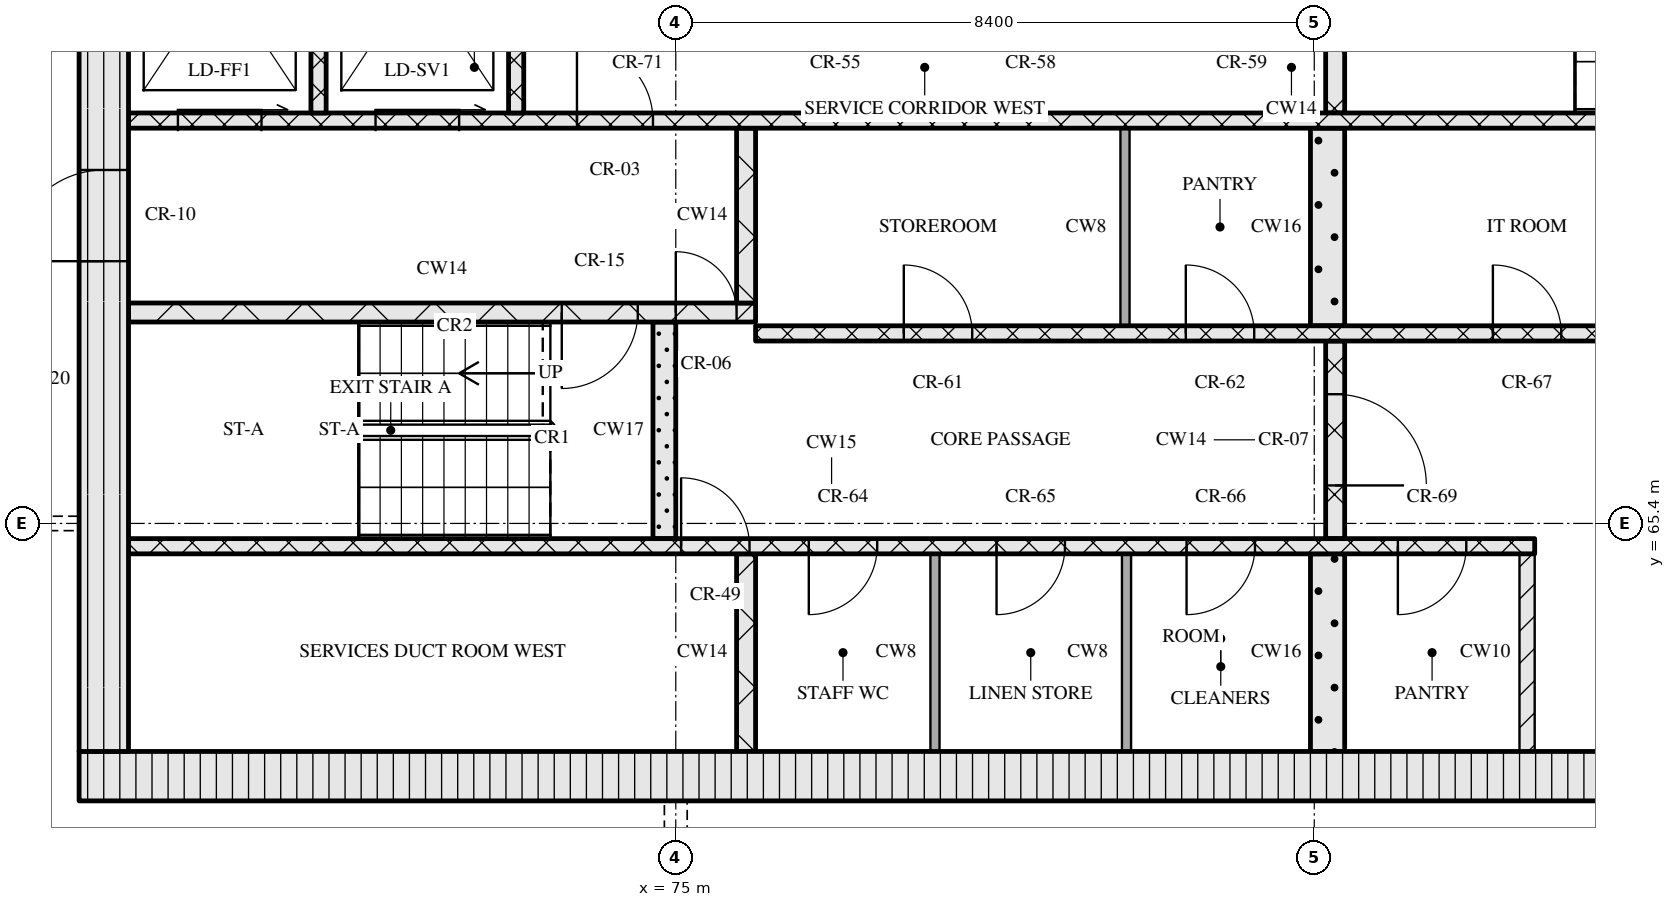
"""IFC4 building model, lengths in metres.
Left out: names, types, materials, properties, quantities, classifications, styles, units other than length and angle.
Written with IfcOpenShell. Run it as: python <this file> out.ifc"""

import sys

from ifc_helpers import new_model, si_unit, direction, frame, frame_2d, origin, place, context, subcontext, project, spatial, rectangle, extrude, element, fill, save


model = new_model("IFC4")
c1 = context("Model", 3, precision=1e-05, world=origin(), true_north=direction((0.0, 1.0)))
c2 = subcontext(c1, "Body", "Model", "MODEL_VIEW")
j1 = project(units=[si_unit("LENGTHUNIT", "METRE"), si_unit("PLANEANGLEUNIT", "RADIAN")], contexts=[c1])
p1 = place(None, origin())
s1 = spatial("IfcSite", under=j1, at=p1, CompositionType="ELEMENT")
p2 = place(p1, origin())
s2 = spatial("IfcBuilding", under=s1, at=p2, CompositionType="ELEMENT")
p3 = place(p2, frame((0.0, 0.0, 248.7)))
s3 = spatial("IfcBuildingStorey", under=s2, at=p3, CompositionType="ELEMENT", Elevation=248.7)
p4 = place(p3, frame((67.15, 62.075, 0.0), z_axis=(0.0, 0.0, 1.0), x_axis=(1.0, 0.0, 0.0)))
e1 = element("IfcWall", 1, at=p4, inside=s3, PredefinedType="SOLIDWALL", context=c2, shape_type="SweptSolid", body=[
    extrude(rectangle(XDim=40.9, YDim=0.65, at=frame_2d((20.45, 0.0))), origin(), (0.0, 0.0, 1.0), 3.3),
])
p5 = place(p4, frame((20.8, 0.0, 0.0)))
e2 = element("IfcOpeningElement", 2, at=p5, cuts=e1, PredefinedType="OPENING", context=c2, shape_type="SweptSolid", body=[
    extrude(rectangle(XDim=1.8, YDim=2.1, at=frame_2d((0.9, 1.05))), frame((0.0, 0.335, 0.0), z_axis=(0.0, -1.0, 0.0), x_axis=(1.0, 0.0, 0.0)), (0.0, 0.0, 1.0), 0.67),
])
p6 = place(p3, frame((67.475, 62.4, 0.0), z_axis=(0.0, 0.0, 1.0), x_axis=(0.0, 1.0, 0.0)))
e3 = element("IfcWall", 3, at=p6, inside=s3, PredefinedType="SOLIDWALL", context=c2, shape_type="SweptSolid", body=[
    extrude(rectangle(XDim=12.0, YDim=0.65, at=frame_2d((6.0, 0.0))), origin(), (0.0, 0.0, 1.0), 3.3),
])
p7 = place(p6, frame((6.45, 0.0, 0.0)))
e4 = element("IfcOpeningElement", 4, at=p7, cuts=e3, PredefinedType="OPENING", context=c2, shape_type="SweptSolid", body=[
    extrude(rectangle(XDim=1.2, YDim=2.1, at=frame_2d((0.6, 1.05))), frame((0.0, 0.335, 0.0), z_axis=(0.0, -1.0, 0.0), x_axis=(1.0, 0.0, 0.0)), (0.0, 0.0, 1.0), 0.67),
])
p8 = place(p3, frame((75.925, 62.4, 0.0), z_axis=(0.0, 0.0, 1.0), x_axis=(0.0, 1.0, 0.0)))
e5 = element("IfcWall", 5, at=p8, inside=s3, PredefinedType="SOLIDWALL", context=c2, shape_type="SweptSolid", body=[
    extrude(rectangle(XDim=2.6, YDim=0.25, at=frame_2d((1.3, 0.0))), origin(), (0.0, 0.0, 1.0), 3.3),
])
for number, where, z_axis, x_axis in (
    (6, (78.41, 62.4, 0.0), (0.0, 0.0, 1.0), (0.0, 1.0, 0.0)),
    (7, (80.93, 62.4, 0.0), (0.0, 0.0, 1.0), (0.0, 1.0, 0.0)),
):
    element("IfcWall", number, at=place(p3, frame(where, z_axis=z_axis, x_axis=x_axis)), inside=s3, PredefinedType="PARTITIONING", context=c2, shape_type="SweptSolid", body=[
        extrude(rectangle(XDim=2.6, YDim=0.12, at=frame_2d((1.3, 0.0))), origin(), (0.0, 0.0, 1.0), 3.3),
    ])
p9 = place(p3, frame((83.575, 62.4, 0.0), z_axis=(0.0, 0.0, 1.0), x_axis=(0.0, 1.0, 0.0)))
e8 = element("IfcWall", 8, at=p9, inside=s3, PredefinedType="SOLIDWALL", context=c2, shape_type="SweptSolid", body=[
    extrude(rectangle(XDim=2.6, YDim=0.45, at=frame_2d((1.3, 0.0))), origin(), (0.0, 0.0, 1.0), 3.3),
])
p10 = place(p3, frame((86.2, 62.4, 0.0), z_axis=(0.0, 0.0, 1.0), x_axis=(0.0, 1.0, 0.0)))
e9 = element("IfcWall", 9, at=p10, inside=s3, PredefinedType="PARTITIONING", context=c2, shape_type="SweptSolid", body=[
    extrude(rectangle(XDim=2.6, YDim=0.2, at=frame_2d((1.3, 0.0))), origin(), (0.0, 0.0, 1.0), 3.3),
])
p11 = place(p3, frame((67.8, 65.1, 0.0), z_axis=(0.0, 0.0, 1.0), x_axis=(1.0, 0.0, 0.0)))
e10 = element("IfcWall", 10, at=p11, inside=s3, PredefinedType="SOLIDWALL", context=c2, shape_type="SweptSolid", body=[
    extrude(rectangle(XDim=18.5, YDim=0.2, at=frame_2d((9.25, 0.0))), origin(), (0.0, 0.0, 1.0), 3.3),
])
p12 = place(p11, frame((7.27, 0.0, 0.0)))
e11 = element("IfcOpeningElement", 11, at=p12, cuts=e10, PredefinedType="OPENING", context=c2, shape_type="SweptSolid", body=[
    extrude(rectangle(XDim=0.9, YDim=2.1, at=frame_2d((0.45, 1.05))), frame((0.0, 0.11, 0.0), z_axis=(0.0, -1.0, 0.0), x_axis=(1.0, 0.0, 0.0)), (0.0, 0.0, 1.0), 0.22),
])
p13 = place(p11, frame((8.95, 0.0, 0.0)))
e12 = element("IfcOpeningElement", 12, at=p13, cuts=e10, PredefinedType="OPENING", context=c2, shape_type="SweptSolid", body=[
    extrude(rectangle(XDim=0.9, YDim=2.1, at=frame_2d((0.45, 1.05))), frame((0.0, 0.11, 0.0), z_axis=(0.0, -1.0, 0.0), x_axis=(1.0, 0.0, 0.0)), (0.0, 0.0, 1.0), 0.22),
])
p14 = place(p11, frame((11.42, 0.0, 0.0)))
e13 = element("IfcOpeningElement", 13, at=p14, cuts=e10, PredefinedType="OPENING", context=c2, shape_type="SweptSolid", body=[
    extrude(rectangle(XDim=0.9, YDim=2.1, at=frame_2d((0.45, 1.05))), frame((0.0, 0.11, 0.0), z_axis=(0.0, -1.0, 0.0), x_axis=(1.0, 0.0, 0.0)), (0.0, 0.0, 1.0), 0.22),
])
p15 = place(p11, frame((13.92, 0.0, 0.0)))
e14 = element("IfcOpeningElement", 14, at=p15, cuts=e10, PredefinedType="OPENING", context=c2, shape_type="SweptSolid", body=[
    extrude(rectangle(XDim=0.9, YDim=2.1, at=frame_2d((0.45, 1.05))), frame((0.0, 0.11, 0.0), z_axis=(0.0, -1.0, 0.0), x_axis=(1.0, 0.0, 0.0)), (0.0, 0.0, 1.0), 0.22),
])
p16 = place(p11, frame((16.7, 0.0, 0.0)))
e15 = element("IfcOpeningElement", 15, at=p16, cuts=e10, PredefinedType="OPENING", context=c2, shape_type="SweptSolid", body=[
    extrude(rectangle(XDim=0.9, YDim=2.1, at=frame_2d((0.45, 1.05))), frame((0.0, 0.11, 0.0), z_axis=(0.0, -1.0, 0.0), x_axis=(1.0, 0.0, 0.0)), (0.0, 0.0, 1.0), 0.22),
])
p17 = place(p3, frame((74.85, 65.2, 0.0), z_axis=(0.0, 0.0, 1.0), x_axis=(0.0, 1.0, 0.0)))
e16 = element("IfcWall", 16, at=p17, inside=s3, PredefinedType="SOLIDWALL", context=c2, shape_type="SweptSolid", body=[
    extrude(rectangle(XDim=2.85, YDim=0.3, at=frame_2d((1.425, 0.0))), origin(), (0.0, 0.0, 1.0), 3.3),
])
p18 = place(p3, frame((83.675, 65.2, 0.0), z_axis=(0.0, 0.0, 1.0), x_axis=(0.0, 1.0, 0.0)))
e17 = element("IfcWall", 17, at=p18, inside=s3, PredefinedType="SOLIDWALL", context=c2, shape_type="SweptSolid", body=[
    extrude(rectangle(XDim=2.6, YDim=0.25, at=frame_2d((1.3, 0.0))), origin(), (0.0, 0.0, 1.0), 3.3),
])
p19 = place(p18, frame((0.7, 0.0, 0.0)))
e18 = element("IfcOpeningElement", 18, at=p19, cuts=e17, PredefinedType="OPENING", context=c2, shape_type="SweptSolid", body=[
    extrude(rectangle(XDim=1.2, YDim=2.1, at=frame_2d((0.6, 1.05))), frame((0.0, 0.135, 0.0), z_axis=(0.0, -1.0, 0.0), x_axis=(1.0, 0.0, 0.0)), (0.0, 0.0, 1.0), 0.27),
])
p20 = place(p3, frame((76.05, 67.9, 0.0), z_axis=(0.0, 0.0, 1.0), x_axis=(1.0, 0.0, 0.0)))
e19 = element("IfcWall", 19, at=p20, inside=s3, PredefinedType="SOLIDWALL", context=c2, shape_type="SweptSolid", body=[
    extrude(rectangle(XDim=23.1, YDim=0.2, at=frame_2d((11.55, 0.0))), origin(), (0.0, 0.0, 1.0), 3.3),
])
p21 = place(p20, frame((1.95, 0.0, 0.0)))
e20 = element("IfcOpeningElement", 20, at=p21, cuts=e19, PredefinedType="OPENING", context=c2, shape_type="SweptSolid", body=[
    extrude(rectangle(XDim=0.9, YDim=2.1, at=frame_2d((0.45, 1.05))), frame((0.0, 0.11, 0.0), z_axis=(0.0, -1.0, 0.0), x_axis=(1.0, 0.0, 0.0)), (0.0, 0.0, 1.0), 0.22),
])
p22 = place(p20, frame((5.66, 0.0, 0.0)))
e21 = element("IfcOpeningElement", 21, at=p22, cuts=e19, PredefinedType="OPENING", context=c2, shape_type="SweptSolid", body=[
    extrude(rectangle(XDim=0.9, YDim=2.1, at=frame_2d((0.45, 1.05))), frame((0.0, 0.11, 0.0), z_axis=(0.0, -1.0, 0.0), x_axis=(1.0, 0.0, 0.0)), (0.0, 0.0, 1.0), 0.22),
])
p23 = place(p20, frame((9.7, 0.0, 0.0)))
e22 = element("IfcOpeningElement", 22, at=p23, cuts=e19, PredefinedType="OPENING", context=c2, shape_type="SweptSolid", body=[
    extrude(rectangle(XDim=0.9, YDim=2.1, at=frame_2d((0.45, 1.05))), frame((0.0, 0.11, 0.0), z_axis=(0.0, -1.0, 0.0), x_axis=(1.0, 0.0, 0.0)), (0.0, 0.0, 1.0), 0.22),
])
p24 = place(p20, frame((13.55, 0.0, 0.0)))
e23 = element("IfcOpeningElement", 23, at=p24, cuts=e19, PredefinedType="OPENING", context=c2, shape_type="SweptSolid", body=[
    extrude(rectangle(XDim=1.0, YDim=2.1, at=frame_2d((0.5, 1.05))), frame((0.0, 0.11, 0.0), z_axis=(0.0, -1.0, 0.0), x_axis=(1.0, 0.0, 0.0)), (0.0, 0.0, 1.0), 0.22),
])
p25 = place(p20, frame((16.2, 0.0, 0.0)))
e24 = element("IfcOpeningElement", 24, at=p25, cuts=e19, PredefinedType="OPENING", context=c2, shape_type="SweptSolid", body=[
    extrude(rectangle(XDim=1.1, YDim=2.1, at=frame_2d((0.55, 1.05))), frame((0.0, 0.11, 0.0), z_axis=(0.0, -1.0, 0.0), x_axis=(1.0, 0.0, 0.0)), (0.0, 0.0, 1.0), 0.22),
])
p26 = place(p20, frame((18.7, 0.0, 0.0)))
e25 = element("IfcOpeningElement", 25, at=p26, cuts=e19, PredefinedType="OPENING", context=c2, shape_type="SweptSolid", body=[
    extrude(rectangle(XDim=1.1, YDim=2.1, at=frame_2d((0.55, 1.05))), frame((0.0, 0.11, 0.0), z_axis=(0.0, -1.0, 0.0), x_axis=(1.0, 0.0, 0.0)), (0.0, 0.0, 1.0), 0.22),
])
p27 = place(p20, frame((21.2, 0.0, 0.0)))
e26 = element("IfcOpeningElement", 26, at=p27, cuts=e19, PredefinedType="OPENING", context=c2, shape_type="SweptSolid", body=[
    extrude(rectangle(XDim=1.1, YDim=2.1, at=frame_2d((0.55, 1.05))), frame((0.0, 0.11, 0.0), z_axis=(0.0, -1.0, 0.0), x_axis=(1.0, 0.0, 0.0)), (0.0, 0.0, 1.0), 0.22),
])
p28 = place(p3, frame((80.91, 68.0, 0.0), z_axis=(0.0, 0.0, 1.0), x_axis=(0.0, 1.0, 0.0)))
e27 = element("IfcWall", 27, at=p28, inside=s3, PredefinedType="PARTITIONING", context=c2, shape_type="SweptSolid", body=[
    extrude(rectangle(XDim=2.6, YDim=0.12, at=frame_2d((1.3, 0.0))), origin(), (0.0, 0.0, 1.0), 3.3),
])
p29 = place(p3, frame((83.575, 68.0, 0.0), z_axis=(0.0, 0.0, 1.0), x_axis=(0.0, 1.0, 0.0)))
e28 = element("IfcWall", 28, at=p29, inside=s3, PredefinedType="SOLIDWALL", context=c2, shape_type="SweptSolid", body=[
    extrude(rectangle(XDim=2.6, YDim=0.45, at=frame_2d((1.3, 0.0))), origin(), (0.0, 0.0, 1.0), 3.3),
])
p30 = place(p3, frame((67.8, 68.175, 0.0), z_axis=(0.0, 0.0, 1.0), x_axis=(1.0, 0.0, 0.0)))
e29 = element("IfcWall", 29, at=p30, inside=s3, PredefinedType="SOLIDWALL", context=c2, shape_type="SweptSolid", body=[
    extrude(rectangle(XDim=8.25, YDim=0.25, at=frame_2d((4.125, 0.0))), origin(), (0.0, 0.0, 1.0), 3.3),
])
p31 = place(p30, frame((5.7, 0.0, 0.0)))
e30 = element("IfcOpeningElement", 30, at=p31, cuts=e29, PredefinedType="OPENING", context=c2, shape_type="SweptSolid", body=[
    extrude(rectangle(XDim=1.0, YDim=2.1, at=frame_2d((0.5, 1.05))), frame((0.0, 0.135, 0.0), z_axis=(0.0, -1.0, 0.0), x_axis=(1.0, 0.0, 0.0)), (0.0, 0.0, 1.0), 0.27),
])
p32 = place(p30, frame((7.2, 0.0, 0.0)))
e31 = element("IfcOpeningElement", 31, at=p32, cuts=e29, PredefinedType="OPENING", context=c2, shape_type="SweptSolid", body=[
    extrude(rectangle(XDim=0.8, YDim=2.1, at=frame_2d((0.4, 1.05))), frame((0.0, 0.135, 0.0), z_axis=(0.0, -1.0, 0.0), x_axis=(1.0, 0.0, 0.0)), (0.0, 0.0, 1.0), 0.27),
])
p33 = place(p3, frame((75.925, 68.3, 0.0), z_axis=(0.0, 0.0, 1.0), x_axis=(0.0, 1.0, 0.0)))
e32 = element("IfcWall", 32, at=p33, inside=s3, PredefinedType="SOLIDWALL", context=c2, shape_type="SweptSolid", body=[
    extrude(rectangle(XDim=2.3, YDim=0.25, at=frame_2d((1.15, 0.0))), origin(), (0.0, 0.0, 1.0), 3.3),
])
p34 = place(p3, frame((67.8, 70.7, 0.0), z_axis=(0.0, 0.0, 1.0), x_axis=(1.0, 0.0, 0.0)))
e33 = element("IfcWall", 33, at=p34, inside=s3, PredefinedType="SOLIDWALL", context=c2, shape_type="SweptSolid", body=[
    extrude(rectangle(XDim=39.6, YDim=0.2, at=frame_2d((19.8, 0.0))), origin(), (0.0, 0.0, 1.0), 3.3),
])
p35 = place(p34, frame((0.65, 0.0, 0.0)))
e34 = element("IfcOpeningElement", 34, at=p35, cuts=e33, PredefinedType="OPENING", context=c2, shape_type="SweptSolid", body=[
    extrude(rectangle(XDim=1.1, YDim=2.1, at=frame_2d((0.55, 1.05))), frame((0.0, 0.11, 0.0), z_axis=(0.0, -1.0, 0.0), x_axis=(1.0, 0.0, 0.0)), (0.0, 0.0, 1.0), 0.22),
])
p36 = place(p34, frame((3.25, 0.0, 0.0)))
e35 = element("IfcOpeningElement", 35, at=p36, cuts=e33, PredefinedType="OPENING", context=c2, shape_type="SweptSolid", body=[
    extrude(rectangle(XDim=1.1, YDim=2.1, at=frame_2d((0.55, 1.05))), frame((0.0, 0.11, 0.0), z_axis=(0.0, -1.0, 0.0), x_axis=(1.0, 0.0, 0.0)), (0.0, 0.0, 1.0), 0.22),
])
p37 = place(p34, frame((5.9, 0.0, 0.0)))
e36 = element("IfcOpeningElement", 36, at=p37, cuts=e33, PredefinedType="OPENING", context=c2, shape_type="SweptSolid", body=[
    extrude(rectangle(XDim=1.0, YDim=2.1, at=frame_2d((0.5, 1.05))), frame((0.0, 0.11, 0.0), z_axis=(0.0, -1.0, 0.0), x_axis=(1.0, 0.0, 0.0)), (0.0, 0.0, 1.0), 0.22),
])
p38 = place(p34, frame((21.7, 0.0, 0.0)))
e37 = element("IfcOpeningElement", 37, at=p38, cuts=e33, PredefinedType="OPENING", context=c2, shape_type="SweptSolid", body=[
    extrude(rectangle(XDim=1.0, YDim=2.1, at=frame_2d((0.5, 1.05))), frame((0.0, 0.11, 0.0), z_axis=(0.0, -1.0, 0.0), x_axis=(1.0, 0.0, 0.0)), (0.0, 0.0, 1.0), 0.22),
])
p39 = place(p34, frame((32.7, 0.0, 0.0)))
e38 = element("IfcOpeningElement", 38, at=p39, cuts=e33, PredefinedType="OPENING", context=c2, shape_type="SweptSolid", body=[
    extrude(rectangle(XDim=1.0, YDim=2.1, at=frame_2d((0.5, 1.05))), frame((0.0, 0.11, 0.0), z_axis=(0.0, -1.0, 0.0), x_axis=(1.0, 0.0, 0.0)), (0.0, 0.0, 1.0), 0.22),
])
p40 = place(p34, frame((35.25, 0.0, 0.0)))
e39 = element("IfcOpeningElement", 39, at=p40, cuts=e33, PredefinedType="OPENING", context=c2, shape_type="SweptSolid", body=[
    extrude(rectangle(XDim=1.1, YDim=2.1, at=frame_2d((0.55, 1.05))), frame((0.0, 0.11, 0.0), z_axis=(0.0, -1.0, 0.0), x_axis=(1.0, 0.0, 0.0)), (0.0, 0.0, 1.0), 0.22),
])
p41 = place(p34, frame((37.85, 0.0, 0.0)))
e40 = element("IfcOpeningElement", 40, at=p41, cuts=e33, PredefinedType="OPENING", context=c2, shape_type="SweptSolid", body=[
    extrude(rectangle(XDim=1.1, YDim=2.1, at=frame_2d((0.55, 1.05))), frame((0.0, 0.11, 0.0), z_axis=(0.0, -1.0, 0.0), x_axis=(1.0, 0.0, 0.0)), (0.0, 0.0, 1.0), 0.22),
])
p42 = place(p3, frame((70.3, 70.8, 0.0), z_axis=(0.0, 0.0, 1.0), x_axis=(0.0, 1.0, 0.0)))
e41 = element("IfcWall", 41, at=p42, inside=s3, PredefinedType="SOLIDWALL", context=c2, shape_type="SweptSolid", body=[
    extrude(rectangle(XDim=3.6, YDim=0.2, at=frame_2d((1.8, 0.0))), origin(), (0.0, 0.0, 1.0), 3.3),
])
p43 = place(p3, frame((72.9, 70.8, 0.0), z_axis=(0.0, 0.0, 1.0), x_axis=(0.0, 1.0, 0.0)))
e42 = element("IfcWall", 42, at=p43, inside=s3, PredefinedType="SOLIDWALL", context=c2, shape_type="SweptSolid", body=[
    extrude(rectangle(XDim=1.2, YDim=0.2, at=frame_2d((0.6, 0.0))), origin(), (0.0, 0.0, 1.0), 3.3),
])
p44 = place(p3, frame((83.675, 70.8, 0.0), z_axis=(0.0, 0.0, 1.0), x_axis=(0.0, 1.0, 0.0)))
e43 = element("IfcWall", 43, at=p44, inside=s3, PredefinedType="SOLIDWALL", context=c2, shape_type="SweptSolid", body=[
    extrude(rectangle(XDim=1.2, YDim=0.25, at=frame_2d((0.6, 0.0))), origin(), (0.0, 0.0, 1.0), 3.3),
])
p45 = place(p12, origin())
e44 = element("IfcDoor", 44, at=p45, inside=s3, OperationType="SINGLE_SWING_LEFT", PredefinedType="DOOR", context=c2, shape_type="SweptSolid", body=[
    extrude(rectangle(XDim=0.9, YDim=2.1, at=frame_2d((0.45, 1.05))), frame((0.0, 0.025, 0.0), z_axis=(0.0, -1.0, 0.0), x_axis=(1.0, 0.0, 0.0)), (0.0, 0.0, 1.0), 0.05),
])
fill(e11, e44)
p46 = place(p13, origin())
e45 = element("IfcDoor", 45, at=p46, inside=s3, OperationType="SINGLE_SWING_RIGHT", PredefinedType="DOOR", context=c2, shape_type="SweptSolid", body=[
    extrude(rectangle(XDim=0.9, YDim=2.1, at=frame_2d((0.45, 1.05))), frame((0.0, 0.025, 0.0), z_axis=(0.0, -1.0, 0.0), x_axis=(1.0, 0.0, 0.0)), (0.0, 0.0, 1.0), 0.05),
])
fill(e12, e45)
p47 = place(p14, origin())
e46 = element("IfcDoor", 46, at=p47, inside=s3, OperationType="SINGLE_SWING_RIGHT", PredefinedType="DOOR", context=c2, shape_type="SweptSolid", body=[
    extrude(rectangle(XDim=0.9, YDim=2.1, at=frame_2d((0.45, 1.05))), frame((0.0, 0.025, 0.0), z_axis=(0.0, -1.0, 0.0), x_axis=(1.0, 0.0, 0.0)), (0.0, 0.0, 1.0), 0.05),
])
fill(e13, e46)
p48 = place(p15, origin())
e47 = element("IfcDoor", 47, at=p48, inside=s3, OperationType="SINGLE_SWING_RIGHT", PredefinedType="DOOR", context=c2, shape_type="SweptSolid", body=[
    extrude(rectangle(XDim=0.9, YDim=2.1, at=frame_2d((0.45, 1.05))), frame((0.0, 0.025, 0.0), z_axis=(0.0, -1.0, 0.0), x_axis=(1.0, 0.0, 0.0)), (0.0, 0.0, 1.0), 0.05),
])
fill(e14, e47)
p49 = place(p16, origin())
e48 = element("IfcDoor", 48, at=p49, inside=s3, OperationType="SINGLE_SWING_RIGHT", PredefinedType="DOOR", context=c2, shape_type="SweptSolid", body=[
    extrude(rectangle(XDim=0.9, YDim=2.1, at=frame_2d((0.45, 1.05))), frame((0.0, 0.025, 0.0), z_axis=(0.0, -1.0, 0.0), x_axis=(1.0, 0.0, 0.0)), (0.0, 0.0, 1.0), 0.05),
])
fill(e15, e48)
p50 = place(p19, origin())
e49 = element("IfcDoor", 49, at=p50, inside=s3, OperationType="SINGLE_SWING_RIGHT", PredefinedType="DOOR", context=c2, shape_type="SweptSolid", body=[
    extrude(rectangle(XDim=1.2, YDim=2.1, at=frame_2d((0.6, 1.05))), frame((0.0, 0.025, 0.0), z_axis=(0.0, -1.0, 0.0), x_axis=(1.0, 0.0, 0.0)), (0.0, 0.0, 1.0), 0.05),
])
fill(e18, e49)
p51 = place(p21, origin())
e50 = element("IfcDoor", 50, at=p51, inside=s3, OperationType="SINGLE_SWING_LEFT", PredefinedType="DOOR", context=c2, shape_type="SweptSolid", body=[
    extrude(rectangle(XDim=0.9, YDim=2.1, at=frame_2d((0.45, 1.05))), frame((0.0, 0.025, 0.0), z_axis=(0.0, -1.0, 0.0), x_axis=(1.0, 0.0, 0.0)), (0.0, 0.0, 1.0), 0.05),
])
fill(e20, e50)
p52 = place(p22, origin())
e51 = element("IfcDoor", 51, at=p52, inside=s3, OperationType="SINGLE_SWING_LEFT", PredefinedType="DOOR", context=c2, shape_type="SweptSolid", body=[
    extrude(rectangle(XDim=0.9, YDim=2.1, at=frame_2d((0.45, 1.05))), frame((0.0, 0.025, 0.0), z_axis=(0.0, -1.0, 0.0), x_axis=(1.0, 0.0, 0.0)), (0.0, 0.0, 1.0), 0.05),
])
fill(e21, e51)
p53 = place(p23, origin())
e52 = element("IfcDoor", 52, at=p53, inside=s3, OperationType="SINGLE_SWING_LEFT", PredefinedType="DOOR", context=c2, shape_type="SweptSolid", body=[
    extrude(rectangle(XDim=0.9, YDim=2.1, at=frame_2d((0.45, 1.05))), frame((0.0, 0.025, 0.0), z_axis=(0.0, -1.0, 0.0), x_axis=(1.0, 0.0, 0.0)), (0.0, 0.0, 1.0), 0.05),
])
fill(e22, e52)
p54 = place(p31, origin())
e53 = element("IfcDoor", 53, at=p54, inside=s3, OperationType="SINGLE_SWING_RIGHT", PredefinedType="DOOR", context=c2, shape_type="SweptSolid", body=[
    extrude(rectangle(XDim=1.0, YDim=2.1, at=frame_2d((0.5, 1.05))), frame((0.0, 0.025, 0.0), z_axis=(0.0, -1.0, 0.0), x_axis=(1.0, 0.0, 0.0)), (0.0, 0.0, 1.0), 0.05),
])
fill(e30, e53)
p55 = place(p32, origin())
e54 = element("IfcDoor", 54, at=p55, inside=s3, OperationType="SINGLE_SWING_LEFT", PredefinedType="DOOR", context=c2, shape_type="SweptSolid", body=[
    extrude(rectangle(XDim=0.8, YDim=2.1, at=frame_2d((0.4, 1.05))), frame((0.0, 0.025, 0.0), z_axis=(0.0, -1.0, 0.0), x_axis=(1.0, 0.0, 0.0)), (0.0, 0.0, 1.0), 0.05),
])
fill(e31, e54)
p56 = place(p7, origin())
e55 = element("IfcDoor", 55, at=p56, inside=s3, OperationType="SINGLE_SWING_LEFT", PredefinedType="DOOR", context=c2, shape_type="SweptSolid", body=[
    extrude(rectangle(XDim=1.2, YDim=2.1, at=frame_2d((0.6, 1.05))), frame((0.0, 0.025, 0.0), z_axis=(0.0, -1.0, 0.0), x_axis=(1.0, 0.0, 0.0)), (0.0, 0.0, 1.0), 0.05),
])
fill(e4, e55)
p57 = place(p35, origin())
e56 = element("IfcDoor", 56, at=p57, inside=s3, OperationType="SLIDING_TO_RIGHT", PredefinedType="DOOR", context=c2, shape_type="SweptSolid", body=[
    extrude(rectangle(XDim=1.1, YDim=2.1, at=frame_2d((0.55, 1.05))), frame((0.0, 0.025, 0.0), z_axis=(0.0, -1.0, 0.0), x_axis=(1.0, 0.0, 0.0)), (0.0, 0.0, 1.0), 0.05),
])
fill(e34, e56)
p58 = place(p36, origin())
e57 = element("IfcDoor", 57, at=p58, inside=s3, OperationType="SLIDING_TO_RIGHT", PredefinedType="DOOR", context=c2, shape_type="SweptSolid", body=[
    extrude(rectangle(XDim=1.1, YDim=2.1, at=frame_2d((0.55, 1.05))), frame((0.0, 0.025, 0.0), z_axis=(0.0, -1.0, 0.0), x_axis=(1.0, 0.0, 0.0)), (0.0, 0.0, 1.0), 0.05),
])
fill(e35, e57)
p59 = place(p37, origin())
e58 = element("IfcDoor", 58, at=p59, inside=s3, OperationType="SINGLE_SWING_LEFT", PredefinedType="DOOR", context=c2, shape_type="SweptSolid", body=[
    extrude(rectangle(XDim=1.0, YDim=2.1, at=frame_2d((0.5, 1.05))), frame((0.0, 0.025, 0.0), z_axis=(0.0, -1.0, 0.0), x_axis=(1.0, 0.0, 0.0)), (0.0, 0.0, 1.0), 0.05),
])
fill(e36, e58)
save(model, sys.argv[1])
